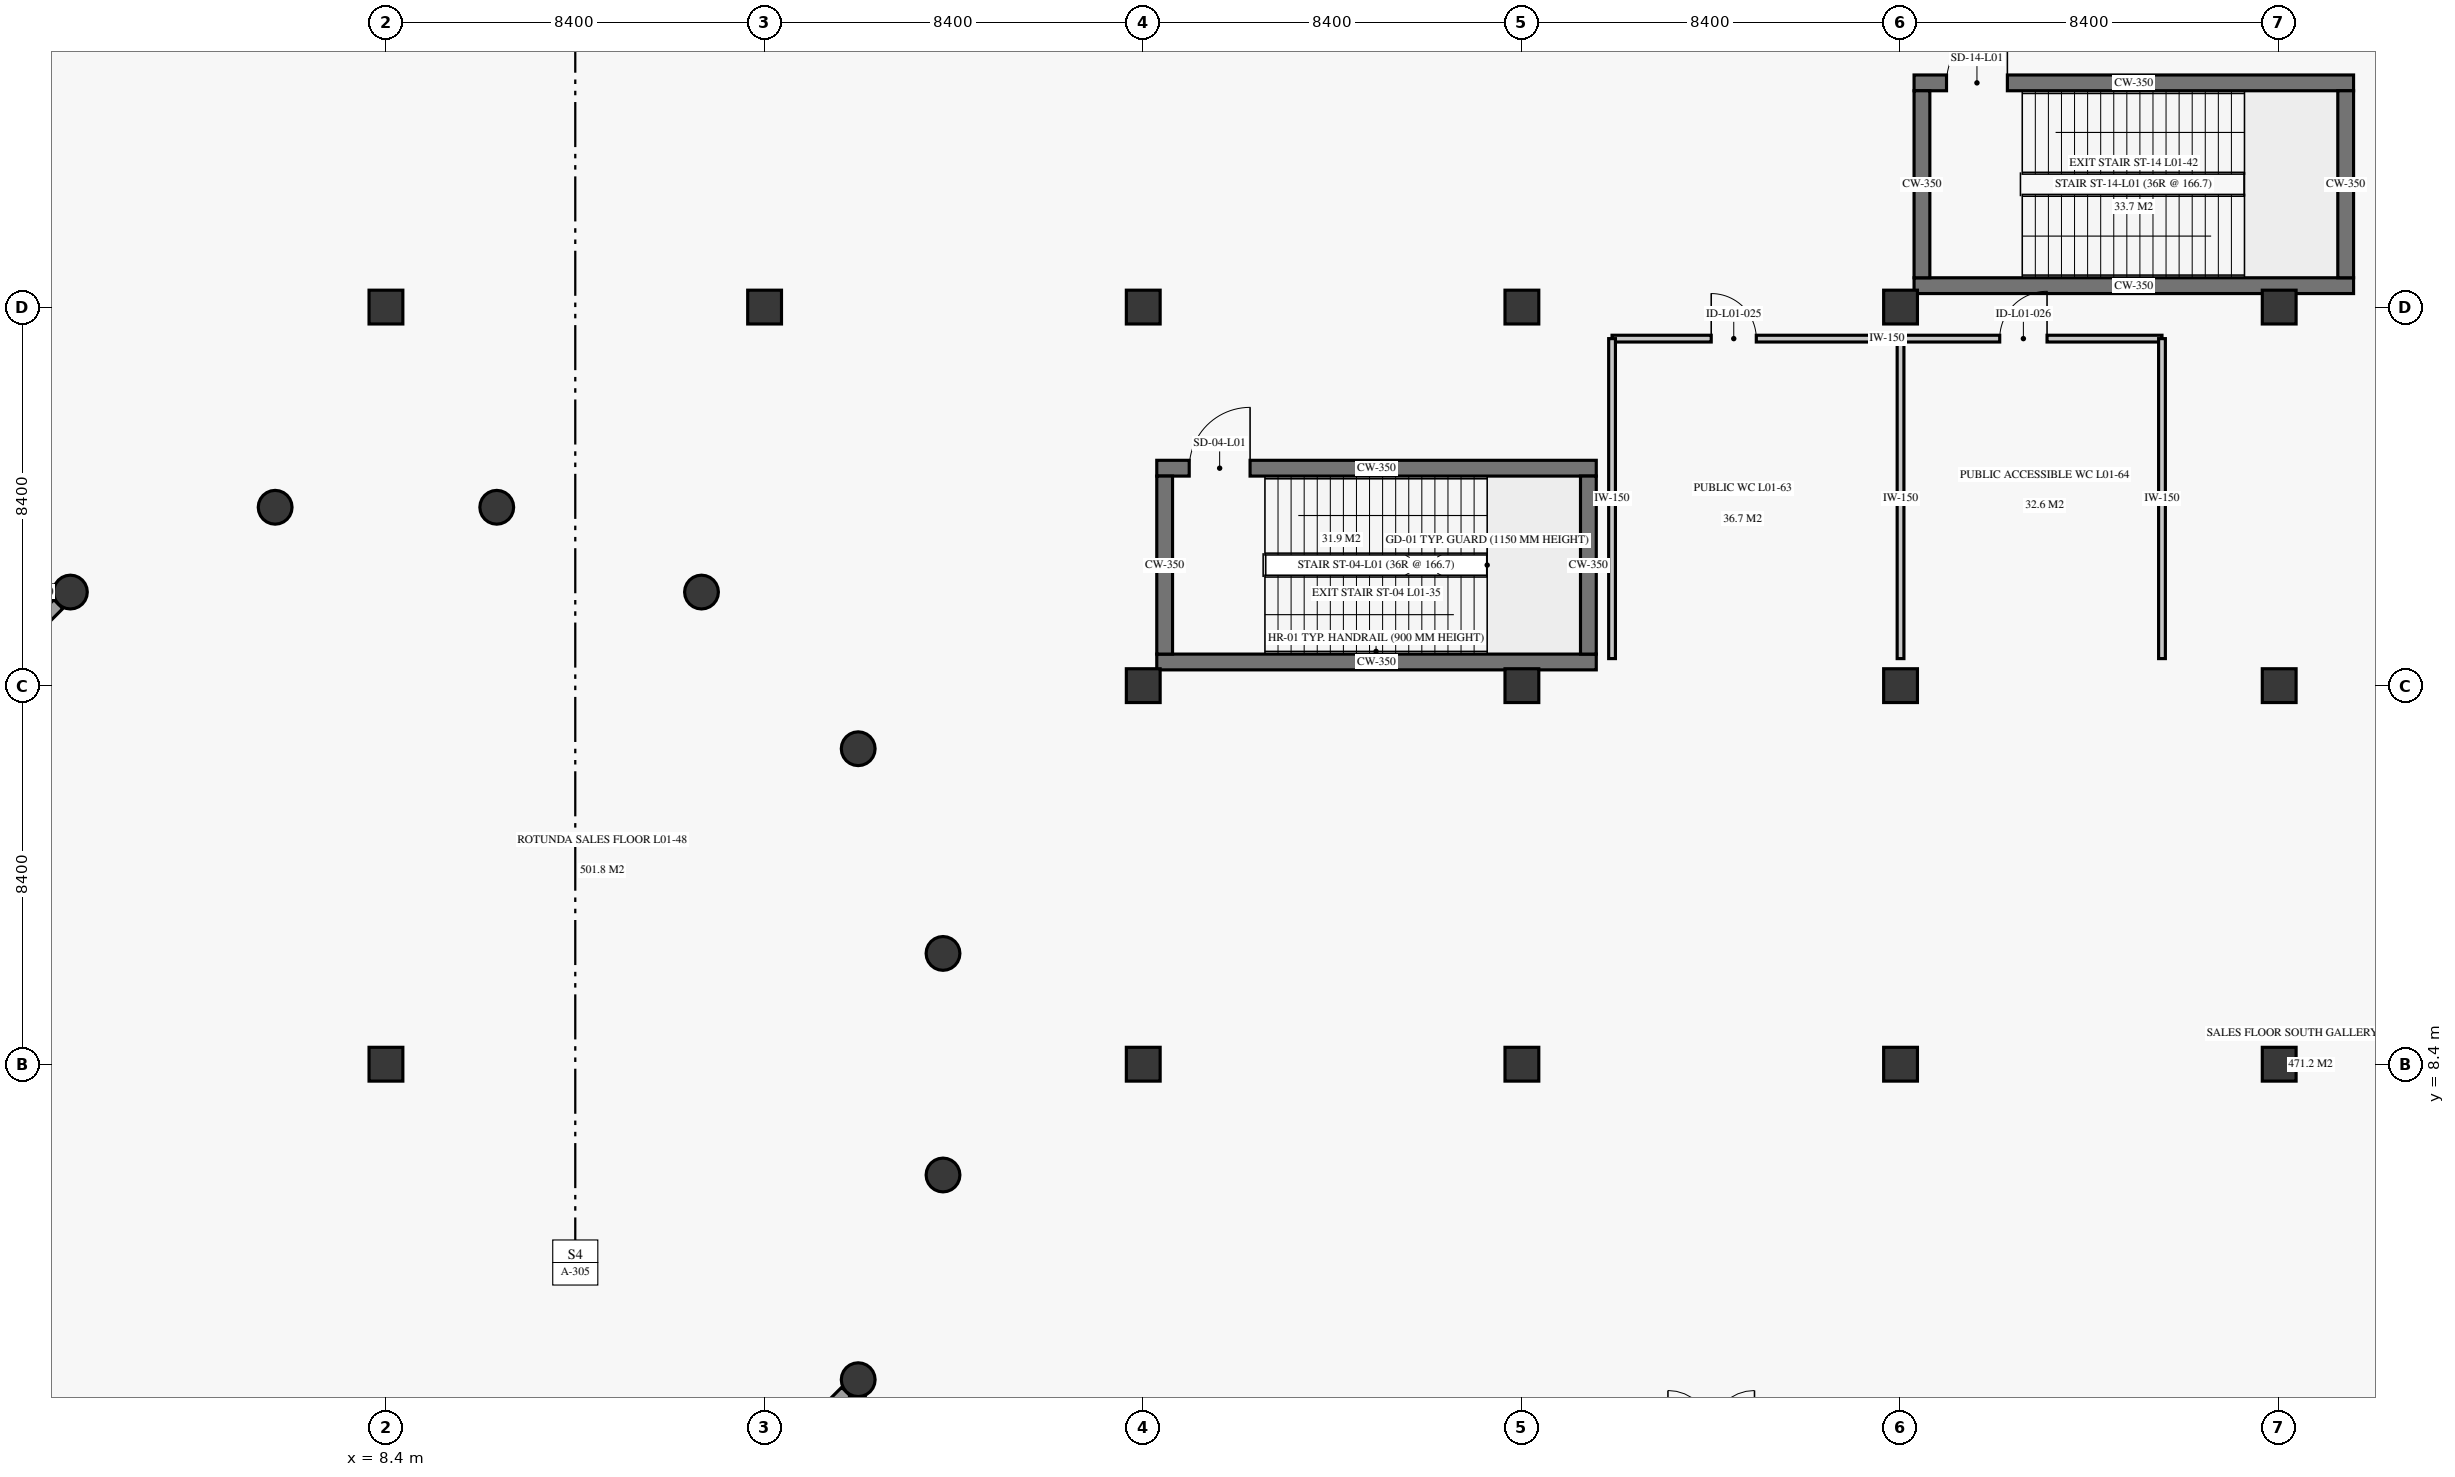
"""IFC4 building model, lengths in metres.
Left out: names, types, materials, properties, quantities, classifications, styles, units other than length and angle.
Written with IfcOpenShell. Run it as: python <this file> out.ifc"""

import sys

from ifc_helpers import new_model, si_unit, direction, frame, frame_2d, origin, origin_2d, place, context, subcontext, project, spatial, rectangle, circle, extrude, element, fill, save


model = new_model("IFC4")
c1 = context("Model", 3, precision=1e-05, world=origin(), true_north=direction((0.0, 1.0)))
c2 = subcontext(c1, "Body", "Model", "MODEL_VIEW")
j1 = project(units=[si_unit("LENGTHUNIT", "METRE"), si_unit("PLANEANGLEUNIT", "RADIAN")], contexts=[c1])
p1 = place(None, origin())
s1 = spatial("IfcSite", under=j1, at=p1, CompositionType="ELEMENT")
p2 = place(p1, origin())
s2 = spatial("IfcBuilding", under=s1, at=p2, CompositionType="ELEMENT")
p3 = place(p2, origin())
s3 = spatial("IfcBuildingStorey", under=s2, at=p3, CompositionType="ELEMENT", Elevation=0.0)
for number, where, z_axis, x_axis in (
    (1, (8.4, 8.4, 0.0), (0.0, 0.0, 1.0), (1.0, 0.0, 0.0)),
    (2, (8.4, 25.2, 0.0), (0.0, 0.0, 1.0), (1.0, 0.0, 0.0)),
    (3, (16.8, 25.2, 0.0), (0.0, 0.0, 1.0), (1.0, 0.0, 0.0)),
    (4, (25.2, 8.4, 0.0), (0.0, 0.0, 1.0), (1.0, 0.0, 0.0)),
    (5, (25.2, 16.8, 0.0), (0.0, 0.0, 1.0), (1.0, 0.0, 0.0)),
    (6, (25.2, 25.2, 0.0), (0.0, 0.0, 1.0), (1.0, 0.0, 0.0)),
    (7, (33.6, 8.4, 0.0), (0.0, 0.0, 1.0), (1.0, 0.0, 0.0)),
    (8, (33.6, 16.8, 0.0), (0.0, 0.0, 1.0), (1.0, 0.0, 0.0)),
    (9, (33.6, 25.2, 0.0), (0.0, 0.0, 1.0), (1.0, 0.0, 0.0)),
    (10, (42.0, 8.4, 0.0), (0.0, 0.0, 1.0), (1.0, 0.0, 0.0)),
    (11, (42.0, 16.8, 0.0), (0.0, 0.0, 1.0), (1.0, 0.0, 0.0)),
    (12, (42.0, 25.2, 0.0), (0.0, 0.0, 1.0), (1.0, 0.0, 0.0)),
    (13, (50.4, 8.4, 0.0), (0.0, 0.0, 1.0), (1.0, 0.0, 0.0)),
    (14, (50.4, 16.8, 0.0), (0.0, 0.0, 1.0), (1.0, 0.0, 0.0)),
    (15, (50.4, 25.2, 0.0), (0.0, 0.0, 1.0), (1.0, 0.0, 0.0)),
):
    element("IfcColumn", number, at=place(p3, frame(where, z_axis=z_axis, x_axis=x_axis)), inside=s3, PredefinedType="COLUMN", context=c2, shape_type="SweptSolid", body=[
        extrude(rectangle(XDim=0.75, YDim=0.75, at=origin_2d()), origin(), (0.0, 0.0, 1.0), 5.7),
    ])
for number, where, z_axis, x_axis in (
    (16, (20.758, 10.858, 0.0), (0.0, 0.0, 1.0), (1.0, 0.0, 0.0)),
    (17, (18.876, 15.4, 0.0), (0.0, 0.0, 1.0), (1.0, 0.0, 0.0)),
    (18, (15.4, 18.876, 0.0), (0.0, 0.0, 1.0), (1.0, 0.0, 0.0)),
    (19, (10.858, 20.758, 0.0), (0.0, 0.0, 1.0), (1.0, 0.0, 0.0)),
    (20, (5.942, 20.758, 0.0), (0.0, 0.0, 1.0), (1.0, 0.0, 0.0)),
    (21, (1.4, 18.876, 0.0), (0.0, 0.0, 1.0), (1.0, 0.0, 0.0)),
    (22, (18.876, 1.4, 0.0), (0.0, 0.0, 1.0), (1.0, 0.0, 0.0)),
    (23, (20.758, 5.942, 0.0), (0.0, 0.0, 1.0), (1.0, 0.0, 0.0)),
):
    element("IfcColumn", number, at=place(p3, frame(where, z_axis=z_axis, x_axis=x_axis)), inside=s3, PredefinedType="COLUMN", context=c2, shape_type="SweptSolid", body=[
        extrude(circle(Radius=0.375, at=origin_2d()), origin(), (0.0, 0.0, 1.0), 5.7),
    ])
p4 = place(p3, frame((1.133, 18.609, 0.0), z_axis=(0.0, 0.0, 1.0), x_axis=(-0.707106781187, -0.707106781187, 0.0)))
e24 = element("IfcWall", 24, at=p4, inside=s3, PredefinedType="SOLIDWALL", context=c2, shape_type="SweptSolid", body=[
    extrude(rectangle(XDim=4.16, YDim=0.28, at=frame_2d((2.08, 0.0))), origin(), (0.0, 0.0, 1.0), 4.98),
])
p5 = place(p4, frame((0.992, 0.0, 1.05)))
e25 = element("IfcOpeningElement", 25, at=p5, cuts=e24, PredefinedType="OPENING", context=c2, shape_type="SweptSolid", body=[
    extrude(rectangle(XDim=1.95, YDim=1.85, at=frame_2d((0.975, 0.925))), frame((0.0, 0.15, 0.0), z_axis=(0.0, -1.0, 0.0), x_axis=(1.0, 0.0, 0.0)), (0.0, 0.0, 1.0), 0.3),
])
p6 = place(p3, frame((-1.809, 1.133, 0.0), z_axis=(0.0, 0.0, 1.0), x_axis=(0.707106781187, -0.707106781187, 0.0)))
e26 = element("IfcWall", 26, at=p6, inside=s3, PredefinedType="SOLIDWALL", context=c2, shape_type="SweptSolid", body=[
    extrude(rectangle(XDim=4.16, YDim=0.28, at=frame_2d((2.08, 0.0))), origin(), (0.0, 0.0, 1.0), 4.98),
])
p7 = place(p6, frame((0.992, 0.0, 0.0)))
e27 = element("IfcOpeningElement", 27, at=p7, cuts=e26, PredefinedType="OPENING", context=c2, shape_type="SweptSolid", body=[
    extrude(rectangle(XDim=2.04, YDim=2.55, at=frame_2d((1.02, 1.275))), frame((0.0, 0.15, 0.0), z_axis=(0.0, -1.0, 0.0), x_axis=(1.0, 0.0, 0.0)), (0.0, 0.0, 1.0), 0.3),
])
p8 = place(p3, frame((15.667, -1.809, 0.0), z_axis=(0.0, 0.0, 1.0), x_axis=(0.707106781187, 0.707106781187, 0.0)))
e28 = element("IfcWall", 28, at=p8, inside=s3, PredefinedType="SOLIDWALL", context=c2, shape_type="SweptSolid", body=[
    extrude(rectangle(XDim=4.16, YDim=0.28, at=frame_2d((2.08, 0.0))), origin(), (0.0, 0.0, 1.0), 4.98),
])
p9 = place(p8, frame((0.992, 0.0, 1.05)))
e29 = element("IfcOpeningElement", 29, at=p9, cuts=e28, PredefinedType="OPENING", context=c2, shape_type="SweptSolid", body=[
    extrude(rectangle(XDim=1.95, YDim=1.85, at=frame_2d((0.975, 0.925))), frame((0.0, 0.15, 0.0), z_axis=(0.0, -1.0, 0.0), x_axis=(1.0, 0.0, 0.0)), (0.0, 0.0, 1.0), 0.3),
])
for number, where, z_axis, x_axis in (
    (30, (0.15, 18.88, 0.0), (0.0, 0.0, 1.0), (1.0, 0.0, 0.0)),
    (31, (18.88, 0.15, 0.0), (0.0, 0.0, 1.0), (0.0, 1.0, 0.0)),
):
    element("IfcWall", number, at=place(p3, frame(where, z_axis=z_axis, x_axis=x_axis)), inside=s3, PredefinedType="SOLIDWALL", context=c2, shape_type="SweptSolid", body=[
        extrude(rectangle(XDim=0.872, YDim=0.31, at=frame_2d((0.436, 0.0))), origin(), (0.0, 0.0, 1.0), 4.98),
    ])
p10 = place(p3, frame((25.5, 17.325, 0.0), z_axis=(0.0, 0.0, 1.0), x_axis=(1.0, 0.0, 0.0)))
e32 = element("IfcWall", 32, at=p10, inside=s3, PredefinedType="SHEAR", context=c2, shape_type="SweptSolid", body=[
    extrude(rectangle(XDim=9.75, YDim=0.35, at=frame_2d((4.875, 0.0))), origin(), (0.0, 0.0, 1.0), 5.7),
])
p11 = place(p3, frame((25.5, 21.625, 0.0), z_axis=(0.0, 0.0, 1.0), x_axis=(1.0, 0.0, 0.0)))
e33 = element("IfcWall", 33, at=p11, inside=s3, PredefinedType="SHEAR", context=c2, shape_type="SweptSolid", body=[
    extrude(rectangle(XDim=9.75, YDim=0.35, at=frame_2d((4.875, 0.0))), origin(), (0.0, 0.0, 1.0), 5.7),
])
p12 = place(p11, frame((0.72, 0.0, 0.0)))
e34 = element("IfcOpeningElement", 34, at=p12, cuts=e33, PredefinedType="OPENING", context=c2, shape_type="SweptSolid", body=[
    extrude(rectangle(XDim=1.35, YDim=2.25, at=frame_2d((0.675, 1.125))), frame((0.0, 0.185, 0.0), z_axis=(0.0, -1.0, 0.0), x_axis=(1.0, 0.0, 0.0)), (0.0, 0.0, 1.0), 0.37),
])
for number, where, z_axis, x_axis in (
    (35, (25.675, 17.5, 0.0), (0.0, 0.0, 1.0), (0.0, 1.0, 0.0)),
    (36, (35.075, 17.5, 0.0), (0.0, 0.0, 1.0), (0.0, 1.0, 0.0)),
):
    element("IfcWall", number, at=place(p3, frame(where, z_axis=z_axis, x_axis=x_axis)), inside=s3, PredefinedType="SHEAR", context=c2, shape_type="SweptSolid", body=[
        extrude(rectangle(XDim=3.95, YDim=0.35, at=frame_2d((1.975, 0.0))), origin(), (0.0, 0.0, 1.0), 5.7),
    ])
p13 = place(p3, frame((42.3, 25.675, 0.0), z_axis=(0.0, 0.0, 1.0), x_axis=(1.0, 0.0, 0.0)))
e37 = element("IfcWall", 37, at=p13, inside=s3, PredefinedType="SHEAR", context=c2, shape_type="SweptSolid", body=[
    extrude(rectangle(XDim=9.75, YDim=0.35, at=frame_2d((4.875, 0.0))), origin(), (0.0, 0.0, 1.0), 5.7),
])
p14 = place(p3, frame((42.3, 30.175, 0.0), z_axis=(0.0, 0.0, 1.0), x_axis=(1.0, 0.0, 0.0)))
e38 = element("IfcWall", 38, at=p14, inside=s3, PredefinedType="SHEAR", context=c2, shape_type="SweptSolid", body=[
    extrude(rectangle(XDim=9.75, YDim=0.35, at=frame_2d((4.875, 0.0))), origin(), (0.0, 0.0, 1.0), 5.7),
])
p15 = place(p14, frame((0.72, 0.0, 0.0)))
e39 = element("IfcOpeningElement", 39, at=p15, cuts=e38, PredefinedType="OPENING", context=c2, shape_type="SweptSolid", body=[
    extrude(rectangle(XDim=1.35, YDim=2.25, at=frame_2d((0.675, 1.125))), frame((0.0, 0.185, 0.0), z_axis=(0.0, -1.0, 0.0), x_axis=(1.0, 0.0, 0.0)), (0.0, 0.0, 1.0), 0.37),
])
for number, where, z_axis, x_axis in (
    (40, (42.475, 25.85, 0.0), (0.0, 0.0, 1.0), (0.0, 1.0, 0.0)),
    (41, (51.875, 25.85, 0.0), (0.0, 0.0, 1.0), (0.0, 1.0, 0.0)),
):
    element("IfcWall", number, at=place(p3, frame(where, z_axis=z_axis, x_axis=x_axis)), inside=s3, PredefinedType="SHEAR", context=c2, shape_type="SweptSolid", body=[
        extrude(rectangle(XDim=4.15, YDim=0.35, at=frame_2d((2.075, 0.0))), origin(), (0.0, 0.0, 1.0), 5.7),
    ])
p16 = place(p3, frame((35.6, 24.5, 0.0), z_axis=(0.0, 0.0, 1.0), x_axis=(1.0, 0.0, 0.0)))
e42 = element("IfcWall", 42, at=p16, inside=s3, PredefinedType="PARTITIONING", context=c2, shape_type="SweptSolid", body=[
    extrude(rectangle(XDim=12.2, YDim=0.15, at=frame_2d((6.1, 0.0))), origin(), (0.0, 0.0, 1.0), 5.32),
])
p17 = place(p16, frame((2.2, 0.0, 0.0)))
e43 = element("IfcOpeningElement", 43, at=p17, cuts=e42, PredefinedType="OPENING", context=c2, shape_type="SweptSolid", body=[
    extrude(rectangle(XDim=1.0, YDim=2.1, at=frame_2d((0.5, 1.05))), frame((0.0, 0.085, 0.0), z_axis=(0.0, -1.0, 0.0), x_axis=(1.0, 0.0, 0.0)), (0.0, 0.0, 1.0), 0.17),
])
p18 = place(p16, frame((8.6, 0.0, 0.0)))
e44 = element("IfcOpeningElement", 44, at=p18, cuts=e42, PredefinedType="OPENING", context=c2, shape_type="SweptSolid", body=[
    extrude(rectangle(XDim=1.05, YDim=2.15, at=frame_2d((0.525, 1.075))), frame((0.0, 0.085, 0.0), z_axis=(0.0, -1.0, 0.0), x_axis=(1.0, 0.0, 0.0)), (0.0, 0.0, 1.0), 0.17),
])
for number, where, z_axis, x_axis in (
    (45, (35.6, 17.4, 0.0), (0.0, 0.0, 1.0), (0.0, 1.0, 0.0)),
    (46, (42.0, 17.4, 0.0), (0.0, 0.0, 1.0), (0.0, 1.0, 0.0)),
    (47, (47.8, 17.4, 0.0), (0.0, 0.0, 1.0), (0.0, 1.0, 0.0)),
):
    element("IfcWall", number, at=place(p3, frame(where, z_axis=z_axis, x_axis=x_axis)), inside=s3, PredefinedType="PARTITIONING", context=c2, shape_type="SweptSolid", body=[
        extrude(rectangle(XDim=7.1, YDim=0.15, at=frame_2d((3.55, 0.0))), origin(), (0.0, 0.0, 1.0), 5.32),
    ])
p19 = place(p12, origin())
e48 = element("IfcDoor", 48, at=p19, inside=s3, OperationType="SINGLE_SWING_RIGHT", PredefinedType="DOOR", context=c2, shape_type="SweptSolid", body=[
    extrude(rectangle(XDim=1.35, YDim=2.25, at=frame_2d((0.675, 1.125))), frame((0.0, 0.025, 0.0), z_axis=(0.0, -1.0, 0.0), x_axis=(1.0, 0.0, 0.0)), (0.0, 0.0, 1.0), 0.05),
])
fill(e34, e48)
p20 = place(p15, origin())
e49 = element("IfcDoor", 49, at=p20, inside=s3, OperationType="SINGLE_SWING_RIGHT", PredefinedType="DOOR", context=c2, shape_type="SweptSolid", body=[
    extrude(rectangle(XDim=1.35, YDim=2.25, at=frame_2d((0.675, 1.125))), frame((0.0, 0.025, 0.0), z_axis=(0.0, -1.0, 0.0), x_axis=(1.0, 0.0, 0.0)), (0.0, 0.0, 1.0), 0.05),
])
fill(e39, e49)
p21 = place(p17, origin())
e50 = element("IfcDoor", 50, at=p21, inside=s3, OperationType="SINGLE_SWING_LEFT", PredefinedType="DOOR", context=c2, shape_type="SweptSolid", body=[
    extrude(rectangle(XDim=1.0, YDim=2.1, at=frame_2d((0.5, 1.05))), frame((0.0, 0.025, 0.0), z_axis=(0.0, -1.0, 0.0), x_axis=(1.0, 0.0, 0.0)), (0.0, 0.0, 1.0), 0.05),
])
fill(e43, e50)
p22 = place(p18, origin())
e51 = element("IfcDoor", 51, at=p22, inside=s3, OperationType="SINGLE_SWING_RIGHT", PredefinedType="DOOR", context=c2, shape_type="SweptSolid", body=[
    extrude(rectangle(XDim=1.05, YDim=2.15, at=frame_2d((0.525, 1.075))), frame((0.0, 0.025, 0.0), z_axis=(0.0, -1.0, 0.0), x_axis=(1.0, 0.0, 0.0)), (0.0, 0.0, 1.0), 0.05),
])
fill(e44, e51)
save(model, sys.argv[1])
